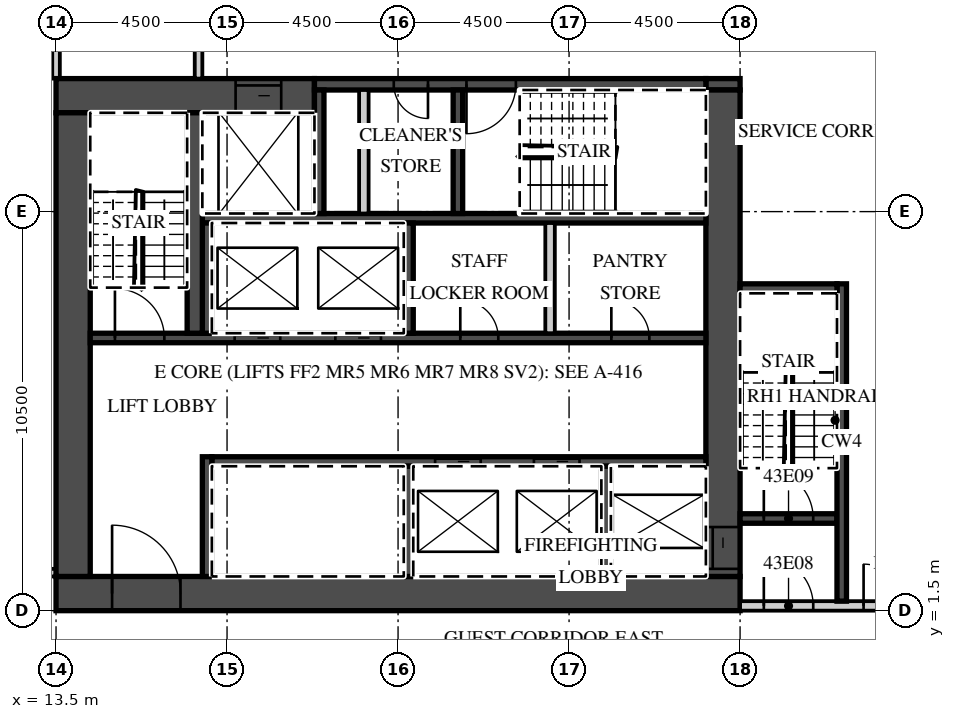
"""IFC4 building model, lengths in metres.
Left out: names, types, materials, properties, quantities, classifications, styles, units other than length and angle.
Written with IfcOpenShell. Run it as: python <this file> out.ifc"""

import sys

from ifc_helpers import new_model, si_unit, direction, frame, frame_2d, origin, place, context, subcontext, project, spatial, rectangle, extrude, element, fill, save


model = new_model("IFC4")
c1 = context("Model", 3, precision=1e-05, world=origin(), true_north=direction((0.0, 1.0)))
c2 = subcontext(c1, "Body", "Model", "MODEL_VIEW")
j1 = project(units=[si_unit("LENGTHUNIT", "METRE"), si_unit("PLANEANGLEUNIT", "RADIAN")], contexts=[c1])
p1 = place(None, origin())
s1 = spatial("IfcSite", under=j1, at=p1, CompositionType="ELEMENT")
p2 = place(p1, origin())
s2 = spatial("IfcBuilding", under=s1, at=p2, CompositionType="ELEMENT")
p3 = place(p2, frame((0.0, 0.0, 183.4)))
s3 = spatial("IfcBuildingStorey", under=s2, at=p3, CompositionType="ELEMENT", Elevation=183.4)
p4 = place(p3, frame((13.5, 15.5, 0.0), z_axis=(0.0, 0.0, 1.0), x_axis=(0.0, 1.0, 0.0)))
e1 = element("IfcWall", 1, at=p4, inside=s3, PredefinedType="PARTITIONING", context=c2, shape_type="SweptSolid", body=[
    extrude(rectangle(XDim=6.089, YDim=0.2, at=frame_2d((3.044, 0.0))), origin(), (0.0, 0.0, 1.0), 3.02),
])
p5 = place(p3, frame((-13.5, 2.5, 0.0), z_axis=(0.0, 0.0, 1.0), x_axis=(1.0, 0.0, 0.0)))
e2 = element("IfcWall", 2, at=p5, inside=s3, PredefinedType="PARTITIONING", context=c2, shape_type="SweptSolid", body=[
    extrude(rectangle(XDim=27.0, YDim=0.2, at=frame_2d((13.5, 0.0))), origin(), (0.0, 0.0, 1.0), 3.02),
])
p6 = place(p5, frame((0.575, 0.0, 0.0)))
e3 = element("IfcOpeningElement", 3, at=p6, cuts=e2, PredefinedType="OPENING", context=c2, shape_type="SweptSolid", body=[
    extrude(rectangle(XDim=1.0, YDim=2.1, at=frame_2d((0.5, 1.05))), frame((0.0, 0.11, 0.0), z_axis=(0.0, -1.0, 0.0), x_axis=(1.0, 0.0, 0.0)), (0.0, 0.0, 1.0), 0.22),
])
p7 = place(p5, frame((9.863, 0.0, 0.0)))
e4 = element("IfcOpeningElement", 4, at=p7, cuts=e2, PredefinedType="OPENING", context=c2, shape_type="SweptSolid", body=[
    extrude(rectangle(XDim=1.2, YDim=2.1, at=frame_2d((0.6, 1.05))), frame((0.0, 0.11, 0.0), z_axis=(0.0, -1.0, 0.0), x_axis=(1.0, 0.0, 0.0)), (0.0, 0.0, 1.0), 0.22),
])
p8 = place(p5, frame((15.938, 0.0, 0.0)))
e5 = element("IfcOpeningElement", 5, at=p8, cuts=e2, PredefinedType="OPENING", context=c2, shape_type="SweptSolid", body=[
    extrude(rectangle(XDim=1.2, YDim=2.1, at=frame_2d((0.6, 1.05))), frame((0.0, 0.11, 0.0), z_axis=(0.0, -1.0, 0.0), x_axis=(1.0, 0.0, 0.0)), (0.0, 0.0, 1.0), 0.22),
])
p9 = place(p5, frame((25.425, 0.0, 0.0)))
e6 = element("IfcOpeningElement", 6, at=p9, cuts=e2, PredefinedType="OPENING", context=c2, shape_type="SweptSolid", body=[
    extrude(rectangle(XDim=1.0, YDim=2.1, at=frame_2d((0.5, 1.05))), frame((0.0, 0.11, 0.0), z_axis=(0.0, -1.0, 0.0), x_axis=(1.0, 0.0, 0.0)), (0.0, 0.0, 1.0), 0.22),
])
p10 = place(p3, frame((13.5, 1.95, 0.0), z_axis=(0.0, 0.0, 1.0), x_axis=(1.0, 0.0, 0.0)))
e7 = element("IfcWall", 7, at=p10, inside=s3, PredefinedType="SHEAR", context=c2, shape_type="SweptSolid", body=[
    extrude(rectangle(XDim=18.0, YDim=0.9, at=frame_2d((9.0, 0.0))), origin(), (0.0, 0.0, 1.0), 3.02),
])
p11 = place(p10, frame((1.475, 0.0, 0.0)))
e8 = element("IfcOpeningElement", 8, at=p11, cuts=e7, PredefinedType="OPENING", context=c2, shape_type="SweptSolid", body=[
    extrude(rectangle(XDim=1.8, YDim=2.1, at=frame_2d((0.9, 1.05))), frame((0.0, 0.46, 0.0), z_axis=(0.0, -1.0, 0.0), x_axis=(1.0, 0.0, 0.0)), (0.0, 0.0, 1.0), 0.92),
])
p12 = place(p3, frame((13.5, 15.05, 0.0), z_axis=(0.0, 0.0, 1.0), x_axis=(1.0, 0.0, 0.0)))
e9 = element("IfcWall", 9, at=p12, inside=s3, PredefinedType="SHEAR", context=c2, shape_type="SweptSolid", body=[
    extrude(rectangle(XDim=6.8, YDim=0.9, at=frame_2d((3.4, 0.0))), origin(), (0.0, 0.0, 1.0), 3.02),
])
p13 = place(p12, frame((4.725, 0.0, 0.0)))
e10 = element("IfcOpeningElement", 10, at=p13, cuts=e9, PredefinedType="OPENING", context=c2, shape_type="SweptSolid", body=[
    extrude(rectangle(XDim=1.2, YDim=2.1, at=frame_2d((0.6, 1.05))), frame((0.0, 0.46, 0.0), z_axis=(0.0, -1.0, 0.0), x_axis=(1.0, 0.0, 0.0)), (0.0, 0.0, 1.0), 0.92),
])
p14 = place(p3, frame((30.6, 15.35, 0.0), z_axis=(0.0, 0.0, 1.0), x_axis=(1.0, 0.0, 0.0)))
e11 = element("IfcWall", 11, at=p14, inside=s3, PredefinedType="SHEAR", context=c2, shape_type="SweptSolid", body=[
    extrude(rectangle(XDim=0.9, YDim=0.3, at=frame_2d((0.45, 0.0))), origin(), (0.0, 0.0, 1.0), 3.02),
])
p15 = place(p3, frame((20.3, 15.35, 0.0), z_axis=(0.0, 0.0, 1.0), x_axis=(1.0, 0.0, 0.0)))
e12 = element("IfcWall", 12, at=p15, inside=s3, PredefinedType="SHEAR", context=c2, shape_type="SweptSolid", body=[
    extrude(rectangle(XDim=10.3, YDim=0.3, at=frame_2d((5.15, 0.0))), origin(), (0.0, 0.0, 1.0), 3.02),
])
p16 = place(p15, frame((4.0, 0.0, 0.0)))
e13 = element("IfcOpeningElement", 13, at=p16, cuts=e12, PredefinedType="OPENING", context=c2, shape_type="SweptSolid", body=[
    extrude(rectangle(XDim=1.3, YDim=2.1, at=frame_2d((0.65, 1.05))), frame((0.0, 0.16, 0.0), z_axis=(0.0, -1.0, 0.0), x_axis=(1.0, 0.0, 0.0)), (0.0, 0.0, 1.0), 0.32),
])
p17 = place(p15, frame((2.087, 0.0, 0.0)))
e14 = element("IfcOpeningElement", 14, at=p17, cuts=e12, PredefinedType="OPENING", context=c2, shape_type="SweptSolid", body=[
    extrude(rectangle(XDim=0.9, YDim=2.1, at=frame_2d((0.45, 1.05))), frame((0.0, 0.16, 0.0), z_axis=(0.0, -1.0, 0.0), x_axis=(1.0, 0.0, 0.0)), (0.0, 0.0, 1.0), 0.32),
])
p18 = place(p3, frame((31.05, 2.4, 0.0), z_axis=(0.0, 0.0, 1.0), x_axis=(0.0, 1.0, 0.0)))
e15 = element("IfcWall", 15, at=p18, inside=s3, PredefinedType="SHEAR", context=c2, shape_type="SweptSolid", body=[
    extrude(rectangle(XDim=12.8, YDim=0.9, at=frame_2d((6.4, 0.0))), origin(), (0.0, 0.0, 1.0), 3.02),
])
p19 = place(p18, frame((0.2, 0.0, 0.0)))
e16 = element("IfcOpeningElement", 16, at=p19, cuts=e15, PredefinedType="OPENING", context=c2, shape_type="SweptSolid", body=[
    extrude(rectangle(XDim=1.1, YDim=2.1, at=frame_2d((0.55, 1.05))), frame((0.0, 0.46, 0.0), z_axis=(0.0, -1.0, 0.0), x_axis=(1.0, 0.0, 0.0)), (0.0, 0.0, 1.0), 0.92),
])
p20 = place(p3, frame((13.95, 2.4, 0.0), z_axis=(0.0, 0.0, 1.0), x_axis=(0.0, 1.0, 0.0)))
e17 = element("IfcWall", 17, at=p20, inside=s3, PredefinedType="SHEAR", context=c2, shape_type="SweptSolid", body=[
    extrude(rectangle(XDim=12.2, YDim=0.9, at=frame_2d((6.1, 0.0))), origin(), (0.0, 0.0, 1.0), 3.02),
])
p21 = place(p3, frame((17.6, 5.425, 0.0), z_axis=(0.0, 0.0, 1.0), x_axis=(1.0, 0.0, 0.0)))
e18 = element("IfcWall", 18, at=p21, inside=s3, PredefinedType="SHEAR", context=c2, shape_type="SweptSolid", body=[
    extrude(rectangle(XDim=13.0, YDim=0.25, at=frame_2d((6.5, 0.0))), origin(), (0.0, 0.0, 1.0), 3.02),
])
p22 = place(p21, frame((8.475, 0.0, 0.0)))
e19 = element("IfcOpeningElement", 19, at=p22, cuts=e18, PredefinedType="OPENING", context=c2, shape_type="SweptSolid", body=[
    extrude(rectangle(XDim=1.2, YDim=2.1, at=frame_2d((0.6, 1.05))), frame((0.0, 0.135, 0.0), z_axis=(0.0, -1.0, 0.0), x_axis=(1.0, 0.0, 0.0)), (0.0, 0.0, 1.0), 0.27),
])
p23 = place(p21, frame((5.875, 0.0, 0.0)))
e20 = element("IfcOpeningElement", 20, at=p23, cuts=e18, PredefinedType="OPENING", context=c2, shape_type="SweptSolid", body=[
    extrude(rectangle(XDim=1.2, YDim=2.1, at=frame_2d((0.6, 1.05))), frame((0.0, 0.135, 0.0), z_axis=(0.0, -1.0, 0.0), x_axis=(1.0, 0.0, 0.0)), (0.0, 0.0, 1.0), 0.27),
])
p24 = place(p3, frame((17.475, 2.4, 0.0), z_axis=(0.0, 0.0, 1.0), x_axis=(0.0, 1.0, 0.0)))
e21 = element("IfcWall", 21, at=p24, inside=s3, PredefinedType="SHEAR", context=c2, shape_type="SweptSolid", body=[
    extrude(rectangle(XDim=3.15, YDim=0.25, at=frame_2d((1.575, 0.0))), origin(), (0.0, 0.0, 1.0), 3.02),
])
for number, where, z_axis, x_axis in (
    (22, (27.975, 2.4, 0.0), (0.0, 0.0, 1.0), (0.0, 1.0, 0.0)),
    (23, (22.775, 2.4, 0.0), (0.0, 0.0, 1.0), (0.0, 1.0, 0.0)),
):
    element("IfcWall", number, at=place(p3, frame(where, z_axis=z_axis, x_axis=x_axis)), inside=s3, PredefinedType="SHEAR", context=c2, shape_type="SweptSolid", body=[
        extrude(rectangle(XDim=2.9, YDim=0.25, at=frame_2d((1.45, 0.0))), origin(), (0.0, 0.0, 1.0), 3.02),
    ])
p25 = place(p3, frame((14.4, 8.675, 0.0), z_axis=(0.0, 0.0, 1.0), x_axis=(1.0, 0.0, 0.0)))
e24 = element("IfcWall", 24, at=p25, inside=s3, PredefinedType="SHEAR", context=c2, shape_type="SweptSolid", body=[
    extrude(rectangle(XDim=16.2, YDim=0.25, at=frame_2d((8.1, 0.0))), origin(), (0.0, 0.0, 1.0), 3.02),
])
p26 = place(p25, frame((6.45, 0.0, 0.0)))
e25 = element("IfcOpeningElement", 25, at=p26, cuts=e24, PredefinedType="OPENING", context=c2, shape_type="SweptSolid", body=[
    extrude(rectangle(XDim=1.2, YDim=2.1, at=frame_2d((0.6, 1.05))), frame((0.0, 0.135, 0.0), z_axis=(0.0, -1.0, 0.0), x_axis=(1.0, 0.0, 0.0)), (0.0, 0.0, 1.0), 0.27),
])
p27 = place(p25, frame((3.8, 0.0, 0.0)))
e26 = element("IfcOpeningElement", 26, at=p27, cuts=e24, PredefinedType="OPENING", context=c2, shape_type="SweptSolid", body=[
    extrude(rectangle(XDim=1.2, YDim=2.1, at=frame_2d((0.6, 1.05))), frame((0.0, 0.135, 0.0), z_axis=(0.0, -1.0, 0.0), x_axis=(1.0, 0.0, 0.0)), (0.0, 0.0, 1.0), 0.27),
])
p28 = place(p25, frame((0.65, 0.0, 0.0)))
e27 = element("IfcOpeningElement", 27, at=p28, cuts=e24, PredefinedType="OPENING", context=c2, shape_type="SweptSolid", body=[
    extrude(rectangle(XDim=1.3, YDim=2.1, at=frame_2d((0.65, 1.05))), frame((0.0, 0.135, 0.0), z_axis=(0.0, -1.0, 0.0), x_axis=(1.0, 0.0, 0.0)), (0.0, 0.0, 1.0), 0.27),
])
p29 = place(p25, frame((13.712, 0.0, 0.0)))
e28 = element("IfcOpeningElement", 28, at=p29, cuts=e24, PredefinedType="OPENING", context=c2, shape_type="SweptSolid", body=[
    extrude(rectangle(XDim=1.0, YDim=2.1, at=frame_2d((0.5, 1.05))), frame((0.0, 0.135, 0.0), z_axis=(0.0, -1.0, 0.0), x_axis=(1.0, 0.0, 0.0)), (0.0, 0.0, 1.0), 0.27),
])
p30 = place(p25, frame((9.738, 0.0, 0.0)))
e29 = element("IfcOpeningElement", 29, at=p30, cuts=e24, PredefinedType="OPENING", context=c2, shape_type="SweptSolid", body=[
    extrude(rectangle(XDim=1.0, YDim=2.1, at=frame_2d((0.5, 1.05))), frame((0.0, 0.135, 0.0), z_axis=(0.0, -1.0, 0.0), x_axis=(1.0, 0.0, 0.0)), (0.0, 0.0, 1.0), 0.27),
])
p31 = place(p3, frame((17.35, 11.825, 0.0), z_axis=(0.0, 0.0, 1.0), x_axis=(1.0, 0.0, 0.0)))
e30 = element("IfcWall", 30, at=p31, inside=s3, PredefinedType="SHEAR", context=c2, shape_type="SweptSolid", body=[
    extrude(rectangle(XDim=13.25, YDim=0.25, at=frame_2d((6.625, 0.0))), origin(), (0.0, 0.0, 1.0), 3.02),
])
for number, where, z_axis, x_axis in (
    (31, (17.475, 8.8, 0.0), (0.0, 0.0, 1.0), (0.0, 1.0, 0.0)),
    (32, (22.775, 8.8, 0.0), (0.0, 0.0, 1.0), (0.0, 1.0, 0.0)),
):
    element("IfcWall", number, at=place(p3, frame(where, z_axis=z_axis, x_axis=x_axis)), inside=s3, PredefinedType="SHEAR", context=c2, shape_type="SweptSolid", body=[
        extrude(rectangle(XDim=2.9, YDim=0.25, at=frame_2d((1.45, 0.0))), origin(), (0.0, 0.0, 1.0), 3.02),
    ])
p32 = place(p3, frame((26.5, 8.8, 0.0), z_axis=(0.0, 0.0, 1.0), x_axis=(0.0, 1.0, 0.0)))
e33 = element("IfcWall", 33, at=p32, inside=s3, PredefinedType="PARTITIONING", context=c2, shape_type="SweptSolid", body=[
    extrude(rectangle(XDim=2.9, YDim=0.25, at=frame_2d((1.45, 0.0))), origin(), (0.0, 0.0, 1.0), 3.02),
])
p33 = place(p3, frame((17.15, 8.8, 0.0), z_axis=(0.0, 0.0, 1.0), x_axis=(0.0, 1.0, 0.0)))
e34 = element("IfcWall", 34, at=p33, inside=s3, PredefinedType="SHEAR", context=c2, shape_type="SweptSolid", body=[
    extrude(rectangle(XDim=5.8, YDim=0.4, at=frame_2d((2.9, 0.0))), origin(), (0.0, 0.0, 1.0), 3.02),
])
for number, where, z_axis, x_axis in (
    (35, (20.425, 11.95, 0.0), (0.0, 0.0, 1.0), (0.0, 1.0, 0.0)),
    (36, (24.075, 11.95, 0.0), (0.0, 0.0, 1.0), (0.0, 1.0, 0.0)),
):
    element("IfcWall", number, at=place(p3, frame(where, z_axis=z_axis, x_axis=x_axis)), inside=s3, PredefinedType="SHEAR", context=c2, shape_type="SweptSolid", body=[
        extrude(rectangle(XDim=3.25, YDim=0.25, at=frame_2d((1.625, 0.0))), origin(), (0.0, 0.0, 1.0), 3.02),
    ])
p34 = place(p3, frame((21.6, 11.95, 0.0), z_axis=(0.0, 0.0, 1.0), x_axis=(0.0, 1.0, 0.0)))
e37 = element("IfcWall", 37, at=p34, inside=s3, PredefinedType="PARTITIONING", context=c2, shape_type="SweptSolid", body=[
    extrude(rectangle(XDim=3.25, YDim=0.25, at=frame_2d((1.625, 0.0))), origin(), (0.0, 0.0, 1.0), 3.02),
])
p35 = place(p3, frame((31.5, 1.625, 0.0), z_axis=(0.0, 0.0, 1.0), x_axis=(1.0, 0.0, 0.0)))
e38 = element("IfcWall", 38, at=p35, inside=s3, PredefinedType="PARTITIONING", context=c2, shape_type="SweptSolid", body=[
    extrude(rectangle(XDim=8.035, YDim=0.25, at=frame_2d((4.018, 0.0))), origin(), (0.0, 0.0, 1.0), 3.02),
])
p36 = place(p35, frame((0.625, 0.0, 0.0)))
e39 = element("IfcOpeningElement", 39, at=p36, cuts=e38, PredefinedType="OPENING", context=c2, shape_type="SweptSolid", body=[
    extrude(rectangle(XDim=1.3, YDim=2.1, at=frame_2d((0.65, 1.05))), frame((0.0, 0.135, 0.0), z_axis=(0.0, -1.0, 0.0), x_axis=(1.0, 0.0, 0.0)), (0.0, 0.0, 1.0), 0.27),
])
p37 = place(p35, frame((3.25, 0.0, 0.0)))
e40 = element("IfcOpeningElement", 40, at=p37, cuts=e38, PredefinedType="OPENING", context=c2, shape_type="SweptSolid", body=[
    extrude(rectangle(XDim=1.1, YDim=2.1, at=frame_2d((0.55, 1.05))), frame((0.0, 0.135, 0.0), z_axis=(0.0, -1.0, 0.0), x_axis=(1.0, 0.0, 0.0)), (0.0, 0.0, 1.0), 0.27),
])
p38 = place(p3, frame((31.5, 3.925, 0.0), z_axis=(0.0, 0.0, 1.0), x_axis=(1.0, 0.0, 0.0)))
e41 = element("IfcWall", 41, at=p38, inside=s3, PredefinedType="SHEAR", context=c2, shape_type="SweptSolid", body=[
    extrude(rectangle(XDim=2.55, YDim=0.25, at=frame_2d((1.275, 0.0))), origin(), (0.0, 0.0, 1.0), 3.02),
])
p39 = place(p38, frame((0.625, 0.0, 0.0)))
e42 = element("IfcOpeningElement", 42, at=p39, cuts=e41, PredefinedType="OPENING", context=c2, shape_type="SweptSolid", body=[
    extrude(rectangle(XDim=1.3, YDim=2.1, at=frame_2d((0.65, 1.05))), frame((0.0, 0.135, 0.0), z_axis=(0.0, -1.0, 0.0), x_axis=(1.0, 0.0, 0.0)), (0.0, 0.0, 1.0), 0.27),
])
p40 = place(p3, frame((34.175, 1.75, 0.0), z_axis=(0.0, 0.0, 1.0), x_axis=(0.0, 1.0, 0.0)))
e43 = element("IfcWall", 43, at=p40, inside=s3, PredefinedType="SHEAR", context=c2, shape_type="SweptSolid", body=[
    extrude(rectangle(XDim=8.35, YDim=0.25, at=frame_2d((4.175, 0.0))), origin(), (0.0, 0.0, 1.0), 3.02),
])
p41 = place(p3, frame((31.5, 9.975, 0.0), z_axis=(0.0, 0.0, 1.0), x_axis=(1.0, 0.0, 0.0)))
e44 = element("IfcWall", 44, at=p41, inside=s3, PredefinedType="SHEAR", context=c2, shape_type="SweptSolid", body=[
    extrude(rectangle(XDim=2.55, YDim=0.25, at=frame_2d((1.275, 0.0))), origin(), (0.0, 0.0, 1.0), 3.02),
])
p42 = place(p3, frame((17.25, 15.5, 0.0), z_axis=(0.0, 0.0, 1.0), x_axis=(0.0, 1.0, 0.0)))
e45 = element("IfcWall", 45, at=p42, inside=s3, PredefinedType="PARTITIONING", context=c2, shape_type="SweptSolid", body=[
    extrude(rectangle(XDim=2.2, YDim=0.2, at=frame_2d((1.1, 0.0))), origin(), (0.0, 0.0, 1.0), 3.02),
])
p43 = place(p26, origin())
e46 = element("IfcDoor", 46, at=p43, inside=s3, OperationType="SLIDING_TO_LEFT", PredefinedType="DOOR", context=c2, shape_type="SweptSolid", body=[
    extrude(rectangle(XDim=1.2, YDim=2.1, at=frame_2d((0.6, 1.05))), frame((0.0, 0.025, 0.0), z_axis=(0.0, -1.0, 0.0), x_axis=(1.0, 0.0, 0.0)), (0.0, 0.0, 1.0), 0.05),
])
fill(e25, e46)
p44 = place(p27, origin())
e47 = element("IfcDoor", 47, at=p44, inside=s3, OperationType="SLIDING_TO_RIGHT", PredefinedType="DOOR", context=c2, shape_type="SweptSolid", body=[
    extrude(rectangle(XDim=1.2, YDim=2.1, at=frame_2d((0.6, 1.05))), frame((0.0, 0.025, 0.0), z_axis=(0.0, -1.0, 0.0), x_axis=(1.0, 0.0, 0.0)), (0.0, 0.0, 1.0), 0.05),
])
fill(e26, e47)
p45 = place(p22, origin())
e48 = element("IfcDoor", 48, at=p45, inside=s3, OperationType="SLIDING_TO_LEFT", PredefinedType="DOOR", context=c2, shape_type="SweptSolid", body=[
    extrude(rectangle(XDim=1.2, YDim=2.1, at=frame_2d((0.6, 1.05))), frame((0.0, 0.025, 0.0), z_axis=(0.0, -1.0, 0.0), x_axis=(1.0, 0.0, 0.0)), (0.0, 0.0, 1.0), 0.05),
])
fill(e19, e48)
p46 = place(p23, origin())
e49 = element("IfcDoor", 49, at=p46, inside=s3, OperationType="SLIDING_TO_RIGHT", PredefinedType="DOOR", context=c2, shape_type="SweptSolid", body=[
    extrude(rectangle(XDim=1.2, YDim=2.1, at=frame_2d((0.6, 1.05))), frame((0.0, 0.025, 0.0), z_axis=(0.0, -1.0, 0.0), x_axis=(1.0, 0.0, 0.0)), (0.0, 0.0, 1.0), 0.05),
])
fill(e20, e49)
p47 = place(p13, origin())
e50 = element("IfcDoor", 50, at=p47, inside=s3, OperationType="SLIDING_TO_LEFT", PredefinedType="DOOR", context=c2, shape_type="SweptSolid", body=[
    extrude(rectangle(XDim=1.2, YDim=2.1, at=frame_2d((0.6, 1.05))), frame((0.0, 0.025, 0.0), z_axis=(0.0, -1.0, 0.0), x_axis=(1.0, 0.0, 0.0)), (0.0, 0.0, 1.0), 0.05),
])
fill(e10, e50)
p48 = place(p19, origin())
e51 = element("IfcDoor", 51, at=p48, inside=s3, OperationType="SLIDING_TO_LEFT", PredefinedType="DOOR", context=c2, shape_type="SweptSolid", body=[
    extrude(rectangle(XDim=1.1, YDim=2.1, at=frame_2d((0.55, 1.05))), frame((0.0, 0.025, 0.0), z_axis=(0.0, -1.0, 0.0), x_axis=(1.0, 0.0, 0.0)), (0.0, 0.0, 1.0), 0.05),
])
fill(e16, e51)
p49 = place(p11, origin())
e52 = element("IfcDoor", 52, at=p49, inside=s3, OperationType="DOUBLE_DOOR_DOUBLE_SWING", PredefinedType="DOOR", context=c2, shape_type="SweptSolid", body=[
    extrude(rectangle(XDim=1.8, YDim=2.1, at=frame_2d((0.9, 1.05))), frame((0.0, 0.025, 0.0), z_axis=(0.0, -1.0, 0.0), x_axis=(1.0, 0.0, 0.0)), (0.0, 0.0, 1.0), 0.05),
])
fill(e8, e52)
p50 = place(p36, origin())
e53 = element("IfcDoor", 53, at=p50, inside=s3, OperationType="SINGLE_SWING_LEFT", PredefinedType="DOOR", context=c2, shape_type="SweptSolid", body=[
    extrude(rectangle(XDim=1.3, YDim=2.1, at=frame_2d((0.65, 1.05))), frame((0.0, 0.025, 0.0), z_axis=(0.0, -1.0, 0.0), x_axis=(1.0, 0.0, 0.0)), (0.0, 0.0, 1.0), 0.05),
])
fill(e39, e53)
p51 = place(p39, origin())
e54 = element("IfcDoor", 54, at=p51, inside=s3, OperationType="SINGLE_SWING_LEFT", PredefinedType="DOOR", context=c2, shape_type="SweptSolid", body=[
    extrude(rectangle(XDim=1.3, YDim=2.1, at=frame_2d((0.65, 1.05))), frame((0.0, 0.025, 0.0), z_axis=(0.0, -1.0, 0.0), x_axis=(1.0, 0.0, 0.0)), (0.0, 0.0, 1.0), 0.05),
])
fill(e42, e54)
p52 = place(p37, origin())
e55 = element("IfcDoor", 55, at=p52, inside=s3, OperationType="SINGLE_SWING_LEFT", PredefinedType="DOOR", context=c2, shape_type="SweptSolid", body=[
    extrude(rectangle(XDim=1.1, YDim=2.1, at=frame_2d((0.55, 1.05))), frame((0.0, 0.025, 0.0), z_axis=(0.0, -1.0, 0.0), x_axis=(1.0, 0.0, 0.0)), (0.0, 0.0, 1.0), 0.05),
])
fill(e40, e55)
p53 = place(p28, origin())
e56 = element("IfcDoor", 56, at=p53, inside=s3, OperationType="SINGLE_SWING_LEFT", PredefinedType="DOOR", context=c2, shape_type="SweptSolid", body=[
    extrude(rectangle(XDim=1.3, YDim=2.1, at=frame_2d((0.65, 1.05))), frame((0.0, 0.025, 0.0), z_axis=(0.0, -1.0, 0.0), x_axis=(1.0, 0.0, 0.0)), (0.0, 0.0, 1.0), 0.05),
])
fill(e27, e56)
p54 = place(p16, origin())
e57 = element("IfcDoor", 57, at=p54, inside=s3, OperationType="SINGLE_SWING_LEFT", PredefinedType="DOOR", context=c2, shape_type="SweptSolid", body=[
    extrude(rectangle(XDim=1.3, YDim=2.1, at=frame_2d((0.65, 1.05))), frame((0.0, 0.025, 0.0), z_axis=(0.0, -1.0, 0.0), x_axis=(1.0, 0.0, 0.0)), (0.0, 0.0, 1.0), 0.05),
])
fill(e13, e57)
p55 = place(p17, origin())
e58 = element("IfcDoor", 58, at=p55, inside=s3, OperationType="SINGLE_SWING_RIGHT", PredefinedType="DOOR", context=c2, shape_type="SweptSolid", body=[
    extrude(rectangle(XDim=0.9, YDim=2.1, at=frame_2d((0.45, 1.05))), frame((0.0, 0.025, 0.0), z_axis=(0.0, -1.0, 0.0), x_axis=(1.0, 0.0, 0.0)), (0.0, 0.0, 1.0), 0.05),
])
fill(e14, e58)
p56 = place(p29, origin())
e59 = element("IfcDoor", 59, at=p56, inside=s3, OperationType="SINGLE_SWING_LEFT", PredefinedType="DOOR", context=c2, shape_type="SweptSolid", body=[
    extrude(rectangle(XDim=1.0, YDim=2.1, at=frame_2d((0.5, 1.05))), frame((0.0, 0.025, 0.0), z_axis=(0.0, -1.0, 0.0), x_axis=(1.0, 0.0, 0.0)), (0.0, 0.0, 1.0), 0.05),
])
fill(e28, e59)
p57 = place(p30, origin())
e60 = element("IfcDoor", 60, at=p57, inside=s3, OperationType="SINGLE_SWING_LEFT", PredefinedType="DOOR", context=c2, shape_type="SweptSolid", body=[
    extrude(rectangle(XDim=1.0, YDim=2.1, at=frame_2d((0.5, 1.05))), frame((0.0, 0.025, 0.0), z_axis=(0.0, -1.0, 0.0), x_axis=(1.0, 0.0, 0.0)), (0.0, 0.0, 1.0), 0.05),
])
fill(e29, e60)
save(model, sys.argv[1])
